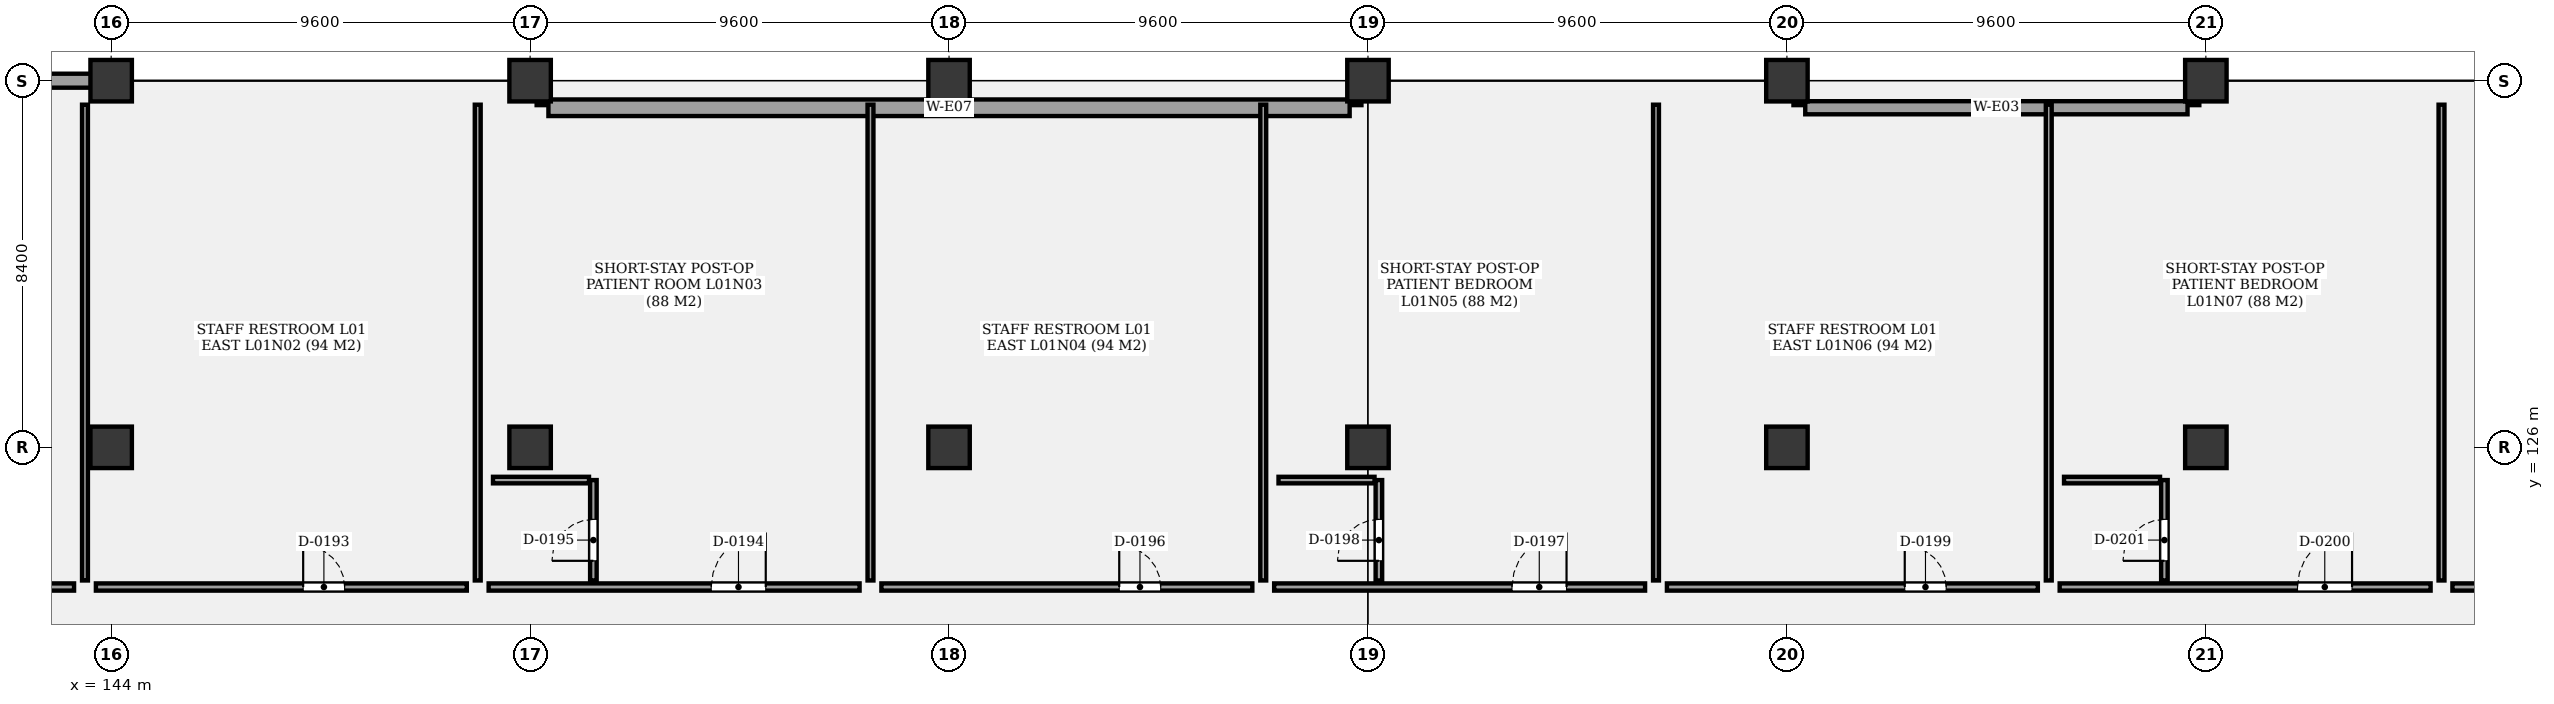
"""IFC4 building model, lengths in metres.
Left out: names, types, materials, properties, quantities, classifications, styles, units other than length and angle.
Written with IfcOpenShell. Run it as: python <this file> out.ifc"""

import sys

from ifc_helpers import new_model, si_unit, direction, frame, frame_2d, origin, origin_2d, place, context, subcontext, project, spatial, rectangle, extrude, element, fill, save


model = new_model("IFC4")
c1 = context("Model", 3, precision=1e-05, world=origin(), true_north=direction((0.0, 1.0)))
c2 = subcontext(c1, "Body", "Model", "MODEL_VIEW")
j1 = project(units=[si_unit("LENGTHUNIT", "METRE"), si_unit("PLANEANGLEUNIT", "RADIAN")], contexts=[c1])
p1 = place(None, origin())
s1 = spatial("IfcSite", under=j1, at=p1, CompositionType="ELEMENT")
p2 = place(p1, origin())
s2 = spatial("IfcBuilding", under=s1, at=p2, CompositionType="ELEMENT")
p3 = place(p2, frame((0.0, 0.0, 5.1)))
s3 = spatial("IfcBuildingStorey", under=s2, at=p3, CompositionType="ELEMENT", Elevation=5.1)
for number, where, z_axis, x_axis in (
    (1, (144.0, 126.0, 0.0), (0.0, 0.0, 1.0), (1.0, 0.0, 0.0)),
    (2, (144.0, 134.4, 0.0), (0.0, 0.0, 1.0), (1.0, 0.0, 0.0)),
    (3, (153.6, 126.0, 0.0), (0.0, 0.0, 1.0), (1.0, 0.0, 0.0)),
    (4, (153.6, 134.4, 0.0), (0.0, 0.0, 1.0), (1.0, 0.0, 0.0)),
    (5, (163.2, 126.0, 0.0), (0.0, 0.0, 1.0), (1.0, 0.0, 0.0)),
    (6, (163.2, 134.4, 0.0), (0.0, 0.0, 1.0), (1.0, 0.0, 0.0)),
    (7, (172.8, 126.0, 0.0), (0.0, 0.0, 1.0), (1.0, 0.0, 0.0)),
    (8, (172.8, 134.4, 0.0), (0.0, 0.0, 1.0), (1.0, 0.0, 0.0)),
    (9, (182.4, 126.0, 0.0), (0.0, 0.0, 1.0), (1.0, 0.0, 0.0)),
    (10, (182.4, 134.4, 0.0), (0.0, 0.0, 1.0), (1.0, 0.0, 0.0)),
    (11, (192.0, 126.0, 0.0), (0.0, 0.0, 1.0), (1.0, 0.0, 0.0)),
    (12, (192.0, 134.4, 0.0), (0.0, 0.0, 1.0), (1.0, 0.0, 0.0)),
):
    element("IfcColumn", number, at=place(p3, frame(where, z_axis=z_axis, x_axis=x_axis)), inside=s3, PredefinedType="COLUMN", context=c2, shape_type="SweptSolid", body=[
        extrude(rectangle(XDim=0.95, YDim=0.95, at=origin_2d()), origin(), (0.0, 0.0, 1.0), 4.8),
    ])
p4 = place(p3, frame((134.4, 134.4, 0.0), z_axis=(0.0, 0.0, 1.0), x_axis=(1.0, 0.0, 0.0)))
e13 = element("IfcWall", 13, at=p4, inside=s3, PredefinedType="SOLIDWALL", context=c2, shape_type="SweptSolid", body=[
    extrude(rectangle(XDim=9.6, YDim=0.32, at=frame_2d((4.8, 0.0))), origin(), (0.0, 0.0, 1.0), 3.94),
])
p5 = place(p4, frame((4.225, 0.0, 0.85)))
e14 = element("IfcOpeningElement", 14, at=p5, cuts=e13, PredefinedType="OPENING", context=c2, shape_type="SweptSolid", body=[
    extrude(rectangle(XDim=1.15, YDim=1.4, at=frame_2d((0.575, 0.7))), frame((0.0, 0.17, 0.0), z_axis=(0.0, -1.0, 0.0), x_axis=(1.0, 0.0, 0.0)), (0.0, 0.0, 1.0), 0.34),
])
for number, where, z_axis, x_axis in (
    (15, (153.88, 134.2, 0.0), (0.0, 0.0, 1.0), (0.0, -1.0, 0.0)),
    (16, (172.52, 134.2, 0.0), (0.0, 0.0, 1.0), (0.0, -1.0, 0.0)),
):
    element("IfcWall", number, at=place(p3, frame(where, z_axis=z_axis, x_axis=x_axis)), inside=s3, PredefinedType="SOLIDWALL", context=c2, shape_type="SweptSolid", body=[
        extrude(rectangle(XDim=0.36, YDim=0.26, at=frame_2d((0.18, 0.0))), origin(), (0.0, 0.0, 1.0), 3.94),
    ])
p6 = place(p3, frame((154.02, 133.78, 0.0), z_axis=(0.0, 0.0, 1.0), x_axis=(1.0, 0.0, 0.0)))
e17 = element("IfcWall", 17, at=p6, inside=s3, PredefinedType="SOLIDWALL", context=c2, shape_type="SweptSolid", body=[
    extrude(rectangle(XDim=18.36, YDim=0.38, at=frame_2d((9.18, 0.0))), origin(), (0.0, 0.0, 1.0), 3.94),
])
for number, where, z_axis, x_axis in (
    (18, (182.68, 134.2, 0.0), (0.0, 0.0, 1.0), (0.0, -1.0, 0.0)),
    (19, (191.72, 134.2, 0.0), (0.0, 0.0, 1.0), (0.0, -1.0, 0.0)),
):
    element("IfcWall", number, at=place(p3, frame(where, z_axis=z_axis, x_axis=x_axis)), inside=s3, PredefinedType="SOLIDWALL", context=c2, shape_type="SweptSolid", body=[
        extrude(rectangle(XDim=0.36, YDim=0.26, at=frame_2d((0.18, 0.0))), origin(), (0.0, 0.0, 1.0), 3.94),
    ])
p7 = place(p3, frame((182.82, 133.78, 0.0), z_axis=(0.0, 0.0, 1.0), x_axis=(1.0, 0.0, 0.0)))
e20 = element("IfcWall", 20, at=p7, inside=s3, PredefinedType="SOLIDWALL", context=c2, shape_type="SweptSolid", body=[
    extrude(rectangle(XDim=8.76, YDim=0.3, at=frame_2d((4.38, 0.0))), origin(), (0.0, 0.0, 1.0), 3.94),
])
p8 = place(p3, frame((134.65, 122.8, 0.0), z_axis=(0.0, 0.0, 1.0), x_axis=(1.0, 0.0, 0.0)))
e21 = element("IfcWall", 21, at=p8, inside=s3, PredefinedType="PARTITIONING", context=c2, shape_type="SweptSolid", body=[
    extrude(rectangle(XDim=8.5, YDim=0.165, at=frame_2d((4.25, 0.0))), origin(), (0.0, 0.0, 1.0), 3.68),
])
p9 = place(p8, frame((4.75, 0.0, 0.0)))
e22 = element("IfcOpeningElement", 22, at=p9, cuts=e21, PredefinedType="OPENING", context=c2, shape_type="SweptSolid", body=[
    extrude(rectangle(XDim=1.25, YDim=2.2, at=frame_2d((0.625, 1.1))), frame((0.0, 0.093, 0.0), z_axis=(0.0, -1.0, 0.0), x_axis=(1.0, 0.0, 0.0)), (0.0, 0.0, 1.0), 0.185),
])
p10 = place(p3, frame((143.65, 122.8, 0.0), z_axis=(0.0, 0.0, 1.0), x_axis=(1.0, 0.0, 0.0)))
e23 = element("IfcWall", 23, at=p10, inside=s3, PredefinedType="PARTITIONING", context=c2, shape_type="SweptSolid", body=[
    extrude(rectangle(XDim=8.5, YDim=0.165, at=frame_2d((4.25, 0.0))), origin(), (0.0, 0.0, 1.0), 3.68),
])
p11 = place(p10, frame((4.75, 0.0, 0.0)))
e24 = element("IfcOpeningElement", 24, at=p11, cuts=e23, PredefinedType="OPENING", context=c2, shape_type="SweptSolid", body=[
    extrude(rectangle(XDim=0.95, YDim=2.1, at=frame_2d((0.475, 1.05))), frame((0.0, 0.093, 0.0), z_axis=(0.0, -1.0, 0.0), x_axis=(1.0, 0.0, 0.0)), (0.0, 0.0, 1.0), 0.185),
])
p12 = place(p3, frame((143.4, 122.95, 0.0), z_axis=(0.0, 0.0, 1.0), x_axis=(0.0, 1.0, 0.0)))
e25 = element("IfcWall", 25, at=p12, inside=s3, PredefinedType="PARTITIONING", context=c2, shape_type="SweptSolid", body=[
    extrude(rectangle(XDim=10.9, YDim=0.135, at=frame_2d((5.45, 0.0))), origin(), (0.0, 0.0, 1.0), 3.68),
])
p13 = place(p3, frame((152.65, 122.8, 0.0), z_axis=(0.0, 0.0, 1.0), x_axis=(1.0, 0.0, 0.0)))
e26 = element("IfcWall", 26, at=p13, inside=s3, PredefinedType="PARTITIONING", context=c2, shape_type="SweptSolid", body=[
    extrude(rectangle(XDim=8.5, YDim=0.165, at=frame_2d((4.25, 0.0))), origin(), (0.0, 0.0, 1.0), 3.68),
])
p14 = place(p13, frame((5.1, 0.0, 0.0)))
e27 = element("IfcOpeningElement", 27, at=p14, cuts=e26, PredefinedType="OPENING", context=c2, shape_type="SweptSolid", body=[
    extrude(rectangle(XDim=1.25, YDim=2.2, at=frame_2d((0.625, 1.1))), frame((0.0, 0.093, 0.0), z_axis=(0.0, -1.0, 0.0), x_axis=(1.0, 0.0, 0.0)), (0.0, 0.0, 1.0), 0.185),
])
p15 = place(p3, frame((155.05, 122.95, 0.0), z_axis=(0.0, 0.0, 1.0), x_axis=(0.0, 1.0, 0.0)))
e28 = element("IfcWall", 28, at=p15, inside=s3, PredefinedType="PARTITIONING", context=c2, shape_type="SweptSolid", body=[
    extrude(rectangle(XDim=2.3, YDim=0.15, at=frame_2d((1.15, 0.0))), origin(), (0.0, 0.0, 1.0), 3.68),
])
p16 = place(p15, frame((0.45, 0.0, 0.0)))
e29 = element("IfcOpeningElement", 29, at=p16, cuts=e28, PredefinedType="OPENING", context=c2, shape_type="SweptSolid", body=[
    extrude(rectangle(XDim=0.95, YDim=2.1, at=frame_2d((0.475, 1.05))), frame((0.0, 0.085, 0.0), z_axis=(0.0, -1.0, 0.0), x_axis=(1.0, 0.0, 0.0)), (0.0, 0.0, 1.0), 0.17),
])
p17 = place(p3, frame((152.75, 125.25, 0.0), z_axis=(0.0, 0.0, 1.0), x_axis=(1.0, 0.0, 0.0)))
e30 = element("IfcWall", 30, at=p17, inside=s3, PredefinedType="PARTITIONING", context=c2, shape_type="SweptSolid", body=[
    extrude(rectangle(XDim=2.2, YDim=0.15, at=frame_2d((1.1, 0.0))), origin(), (0.0, 0.0, 1.0), 3.68),
])
p18 = place(p3, frame((152.4, 122.95, 0.0), z_axis=(0.0, 0.0, 1.0), x_axis=(0.0, 1.0, 0.0)))
e31 = element("IfcWall", 31, at=p18, inside=s3, PredefinedType="PARTITIONING", context=c2, shape_type="SweptSolid", body=[
    extrude(rectangle(XDim=10.9, YDim=0.135, at=frame_2d((5.45, 0.0))), origin(), (0.0, 0.0, 1.0), 3.68),
])
p19 = place(p3, frame((161.65, 122.8, 0.0), z_axis=(0.0, 0.0, 1.0), x_axis=(1.0, 0.0, 0.0)))
e32 = element("IfcWall", 32, at=p19, inside=s3, PredefinedType="PARTITIONING", context=c2, shape_type="SweptSolid", body=[
    extrude(rectangle(XDim=8.5, YDim=0.165, at=frame_2d((4.25, 0.0))), origin(), (0.0, 0.0, 1.0), 3.68),
])
p20 = place(p19, frame((5.45, 0.0, 0.0)))
e33 = element("IfcOpeningElement", 33, at=p20, cuts=e32, PredefinedType="OPENING", context=c2, shape_type="SweptSolid", body=[
    extrude(rectangle(XDim=0.95, YDim=2.1, at=frame_2d((0.475, 1.05))), frame((0.0, 0.093, 0.0), z_axis=(0.0, -1.0, 0.0), x_axis=(1.0, 0.0, 0.0)), (0.0, 0.0, 1.0), 0.185),
])
p21 = place(p3, frame((161.4, 122.95, 0.0), z_axis=(0.0, 0.0, 1.0), x_axis=(0.0, 1.0, 0.0)))
e34 = element("IfcWall", 34, at=p21, inside=s3, PredefinedType="PARTITIONING", context=c2, shape_type="SweptSolid", body=[
    extrude(rectangle(XDim=10.9, YDim=0.135, at=frame_2d((5.45, 0.0))), origin(), (0.0, 0.0, 1.0), 3.68),
])
p22 = place(p3, frame((170.65, 122.8, 0.0), z_axis=(0.0, 0.0, 1.0), x_axis=(1.0, 0.0, 0.0)))
e35 = element("IfcWall", 35, at=p22, inside=s3, PredefinedType="PARTITIONING", context=c2, shape_type="SweptSolid", body=[
    extrude(rectangle(XDim=8.5, YDim=0.165, at=frame_2d((4.25, 0.0))), origin(), (0.0, 0.0, 1.0), 3.68),
])
p23 = place(p22, frame((5.45, 0.0, 0.0)))
e36 = element("IfcOpeningElement", 36, at=p23, cuts=e35, PredefinedType="OPENING", context=c2, shape_type="SweptSolid", body=[
    extrude(rectangle(XDim=1.25, YDim=2.2, at=frame_2d((0.625, 1.1))), frame((0.0, 0.093, 0.0), z_axis=(0.0, -1.0, 0.0), x_axis=(1.0, 0.0, 0.0)), (0.0, 0.0, 1.0), 0.185),
])
p24 = place(p3, frame((173.05, 122.95, 0.0), z_axis=(0.0, 0.0, 1.0), x_axis=(0.0, 1.0, 0.0)))
e37 = element("IfcWall", 37, at=p24, inside=s3, PredefinedType="PARTITIONING", context=c2, shape_type="SweptSolid", body=[
    extrude(rectangle(XDim=2.3, YDim=0.15, at=frame_2d((1.15, 0.0))), origin(), (0.0, 0.0, 1.0), 3.68),
])
p25 = place(p24, frame((0.45, 0.0, 0.0)))
e38 = element("IfcOpeningElement", 38, at=p25, cuts=e37, PredefinedType="OPENING", context=c2, shape_type="SweptSolid", body=[
    extrude(rectangle(XDim=0.95, YDim=2.1, at=frame_2d((0.475, 1.05))), frame((0.0, 0.085, 0.0), z_axis=(0.0, -1.0, 0.0), x_axis=(1.0, 0.0, 0.0)), (0.0, 0.0, 1.0), 0.17),
])
p26 = place(p3, frame((170.75, 125.25, 0.0), z_axis=(0.0, 0.0, 1.0), x_axis=(1.0, 0.0, 0.0)))
e39 = element("IfcWall", 39, at=p26, inside=s3, PredefinedType="PARTITIONING", context=c2, shape_type="SweptSolid", body=[
    extrude(rectangle(XDim=2.2, YDim=0.15, at=frame_2d((1.1, 0.0))), origin(), (0.0, 0.0, 1.0), 3.68),
])
p27 = place(p3, frame((170.4, 122.95, 0.0), z_axis=(0.0, 0.0, 1.0), x_axis=(0.0, 1.0, 0.0)))
e40 = element("IfcWall", 40, at=p27, inside=s3, PredefinedType="PARTITIONING", context=c2, shape_type="SweptSolid", body=[
    extrude(rectangle(XDim=10.9, YDim=0.135, at=frame_2d((5.45, 0.0))), origin(), (0.0, 0.0, 1.0), 3.68),
])
p28 = place(p3, frame((179.65, 122.8, 0.0), z_axis=(0.0, 0.0, 1.0), x_axis=(1.0, 0.0, 0.0)))
e41 = element("IfcWall", 41, at=p28, inside=s3, PredefinedType="PARTITIONING", context=c2, shape_type="SweptSolid", body=[
    extrude(rectangle(XDim=8.5, YDim=0.165, at=frame_2d((4.25, 0.0))), origin(), (0.0, 0.0, 1.0), 3.68),
])
p29 = place(p28, frame((5.45, 0.0, 0.0)))
e42 = element("IfcOpeningElement", 42, at=p29, cuts=e41, PredefinedType="OPENING", context=c2, shape_type="SweptSolid", body=[
    extrude(rectangle(XDim=0.95, YDim=2.1, at=frame_2d((0.475, 1.05))), frame((0.0, 0.093, 0.0), z_axis=(0.0, -1.0, 0.0), x_axis=(1.0, 0.0, 0.0)), (0.0, 0.0, 1.0), 0.185),
])
p30 = place(p3, frame((179.4, 122.95, 0.0), z_axis=(0.0, 0.0, 1.0), x_axis=(0.0, 1.0, 0.0)))
e43 = element("IfcWall", 43, at=p30, inside=s3, PredefinedType="PARTITIONING", context=c2, shape_type="SweptSolid", body=[
    extrude(rectangle(XDim=10.9, YDim=0.135, at=frame_2d((5.45, 0.0))), origin(), (0.0, 0.0, 1.0), 3.68),
])
p31 = place(p3, frame((188.65, 122.8, 0.0), z_axis=(0.0, 0.0, 1.0), x_axis=(1.0, 0.0, 0.0)))
e44 = element("IfcWall", 44, at=p31, inside=s3, PredefinedType="PARTITIONING", context=c2, shape_type="SweptSolid", body=[
    extrude(rectangle(XDim=8.5, YDim=0.165, at=frame_2d((4.25, 0.0))), origin(), (0.0, 0.0, 1.0), 3.68),
])
p32 = place(p31, frame((5.45, 0.0, 0.0)))
e45 = element("IfcOpeningElement", 45, at=p32, cuts=e44, PredefinedType="OPENING", context=c2, shape_type="SweptSolid", body=[
    extrude(rectangle(XDim=1.25, YDim=2.2, at=frame_2d((0.625, 1.1))), frame((0.0, 0.093, 0.0), z_axis=(0.0, -1.0, 0.0), x_axis=(1.0, 0.0, 0.0)), (0.0, 0.0, 1.0), 0.185),
])
p33 = place(p3, frame((191.05, 122.95, 0.0), z_axis=(0.0, 0.0, 1.0), x_axis=(0.0, 1.0, 0.0)))
e46 = element("IfcWall", 46, at=p33, inside=s3, PredefinedType="PARTITIONING", context=c2, shape_type="SweptSolid", body=[
    extrude(rectangle(XDim=2.3, YDim=0.15, at=frame_2d((1.15, 0.0))), origin(), (0.0, 0.0, 1.0), 3.68),
])
p34 = place(p33, frame((0.45, 0.0, 0.0)))
e47 = element("IfcOpeningElement", 47, at=p34, cuts=e46, PredefinedType="OPENING", context=c2, shape_type="SweptSolid", body=[
    extrude(rectangle(XDim=0.95, YDim=2.1, at=frame_2d((0.475, 1.05))), frame((0.0, 0.085, 0.0), z_axis=(0.0, -1.0, 0.0), x_axis=(1.0, 0.0, 0.0)), (0.0, 0.0, 1.0), 0.17),
])
p35 = place(p3, frame((188.75, 125.25, 0.0), z_axis=(0.0, 0.0, 1.0), x_axis=(1.0, 0.0, 0.0)))
e48 = element("IfcWall", 48, at=p35, inside=s3, PredefinedType="PARTITIONING", context=c2, shape_type="SweptSolid", body=[
    extrude(rectangle(XDim=2.2, YDim=0.15, at=frame_2d((1.1, 0.0))), origin(), (0.0, 0.0, 1.0), 3.68),
])
p36 = place(p3, frame((188.4, 122.95, 0.0), z_axis=(0.0, 0.0, 1.0), x_axis=(0.0, 1.0, 0.0)))
e49 = element("IfcWall", 49, at=p36, inside=s3, PredefinedType="PARTITIONING", context=c2, shape_type="SweptSolid", body=[
    extrude(rectangle(XDim=10.9, YDim=0.135, at=frame_2d((5.45, 0.0))), origin(), (0.0, 0.0, 1.0), 3.68),
])
p37 = place(p3, frame((197.65, 122.8, 0.0), z_axis=(0.0, 0.0, 1.0), x_axis=(1.0, 0.0, 0.0)))
e50 = element("IfcWall", 50, at=p37, inside=s3, PredefinedType="PARTITIONING", context=c2, shape_type="SweptSolid", body=[
    extrude(rectangle(XDim=8.5, YDim=0.165, at=frame_2d((4.25, 0.0))), origin(), (0.0, 0.0, 1.0), 3.68),
])
p38 = place(p37, frame((5.45, 0.0, 0.0)))
e51 = element("IfcOpeningElement", 51, at=p38, cuts=e50, PredefinedType="OPENING", context=c2, shape_type="SweptSolid", body=[
    extrude(rectangle(XDim=0.95, YDim=2.1, at=frame_2d((0.475, 1.05))), frame((0.0, 0.093, 0.0), z_axis=(0.0, -1.0, 0.0), x_axis=(1.0, 0.0, 0.0)), (0.0, 0.0, 1.0), 0.185),
])
p39 = place(p3, frame((197.4, 122.95, 0.0), z_axis=(0.0, 0.0, 1.0), x_axis=(0.0, 1.0, 0.0)))
e52 = element("IfcWall", 52, at=p39, inside=s3, PredefinedType="PARTITIONING", context=c2, shape_type="SweptSolid", body=[
    extrude(rectangle(XDim=10.9, YDim=0.135, at=frame_2d((5.45, 0.0))), origin(), (0.0, 0.0, 1.0), 3.68),
])
p40 = place(p11, origin())
e53 = element("IfcDoor", 53, at=p40, inside=s3, OperationType="SINGLE_SWING_LEFT", PredefinedType="DOOR", context=c2, shape_type="SweptSolid", body=[
    extrude(rectangle(XDim=0.95, YDim=2.1, at=frame_2d((0.475, 1.05))), frame((0.0, 0.025, 0.0), z_axis=(0.0, -1.0, 0.0), x_axis=(1.0, 0.0, 0.0)), (0.0, 0.0, 1.0), 0.05),
])
fill(e24, e53)
p41 = place(p14, origin())
e54 = element("IfcDoor", 54, at=p41, inside=s3, OperationType="SINGLE_SWING_RIGHT", PredefinedType="DOOR", context=c2, shape_type="SweptSolid", body=[
    extrude(rectangle(XDim=1.25, YDim=2.2, at=frame_2d((0.625, 1.1))), frame((0.0, 0.025, 0.0), z_axis=(0.0, -1.0, 0.0), x_axis=(1.0, 0.0, 0.0)), (0.0, 0.0, 1.0), 0.05),
])
fill(e27, e54)
p42 = place(p16, origin())
e55 = element("IfcDoor", 55, at=p42, inside=s3, OperationType="SINGLE_SWING_LEFT", PredefinedType="DOOR", context=c2, shape_type="SweptSolid", body=[
    extrude(rectangle(XDim=0.95, YDim=2.1, at=frame_2d((0.475, 1.05))), frame((0.0, 0.025, 0.0), z_axis=(0.0, -1.0, 0.0), x_axis=(1.0, 0.0, 0.0)), (0.0, 0.0, 1.0), 0.05),
])
fill(e29, e55)
p43 = place(p20, origin())
e56 = element("IfcDoor", 56, at=p43, inside=s3, OperationType="SINGLE_SWING_LEFT", PredefinedType="DOOR", context=c2, shape_type="SweptSolid", body=[
    extrude(rectangle(XDim=0.95, YDim=2.1, at=frame_2d((0.475, 1.05))), frame((0.0, 0.025, 0.0), z_axis=(0.0, -1.0, 0.0), x_axis=(1.0, 0.0, 0.0)), (0.0, 0.0, 1.0), 0.05),
])
fill(e33, e56)
p44 = place(p23, origin())
e57 = element("IfcDoor", 57, at=p44, inside=s3, OperationType="SINGLE_SWING_RIGHT", PredefinedType="DOOR", context=c2, shape_type="SweptSolid", body=[
    extrude(rectangle(XDim=1.25, YDim=2.2, at=frame_2d((0.625, 1.1))), frame((0.0, 0.025, 0.0), z_axis=(0.0, -1.0, 0.0), x_axis=(1.0, 0.0, 0.0)), (0.0, 0.0, 1.0), 0.05),
])
fill(e36, e57)
p45 = place(p25, origin())
e58 = element("IfcDoor", 58, at=p45, inside=s3, OperationType="SINGLE_SWING_LEFT", PredefinedType="DOOR", context=c2, shape_type="SweptSolid", body=[
    extrude(rectangle(XDim=0.95, YDim=2.1, at=frame_2d((0.475, 1.05))), frame((0.0, 0.025, 0.0), z_axis=(0.0, -1.0, 0.0), x_axis=(1.0, 0.0, 0.0)), (0.0, 0.0, 1.0), 0.05),
])
fill(e38, e58)
p46 = place(p29, origin())
e59 = element("IfcDoor", 59, at=p46, inside=s3, OperationType="SINGLE_SWING_LEFT", PredefinedType="DOOR", context=c2, shape_type="SweptSolid", body=[
    extrude(rectangle(XDim=0.95, YDim=2.1, at=frame_2d((0.475, 1.05))), frame((0.0, 0.025, 0.0), z_axis=(0.0, -1.0, 0.0), x_axis=(1.0, 0.0, 0.0)), (0.0, 0.0, 1.0), 0.05),
])
fill(e42, e59)
p47 = place(p32, origin())
e60 = element("IfcDoor", 60, at=p47, inside=s3, OperationType="SINGLE_SWING_RIGHT", PredefinedType="DOOR", context=c2, shape_type="SweptSolid", body=[
    extrude(rectangle(XDim=1.25, YDim=2.2, at=frame_2d((0.625, 1.1))), frame((0.0, 0.025, 0.0), z_axis=(0.0, -1.0, 0.0), x_axis=(1.0, 0.0, 0.0)), (0.0, 0.0, 1.0), 0.05),
])
fill(e45, e60)
p48 = place(p34, origin())
e61 = element("IfcDoor", 61, at=p48, inside=s3, OperationType="SINGLE_SWING_LEFT", PredefinedType="DOOR", context=c2, shape_type="SweptSolid", body=[
    extrude(rectangle(XDim=0.95, YDim=2.1, at=frame_2d((0.475, 1.05))), frame((0.0, 0.025, 0.0), z_axis=(0.0, -1.0, 0.0), x_axis=(1.0, 0.0, 0.0)), (0.0, 0.0, 1.0), 0.05),
])
fill(e47, e61)
save(model, sys.argv[1])
